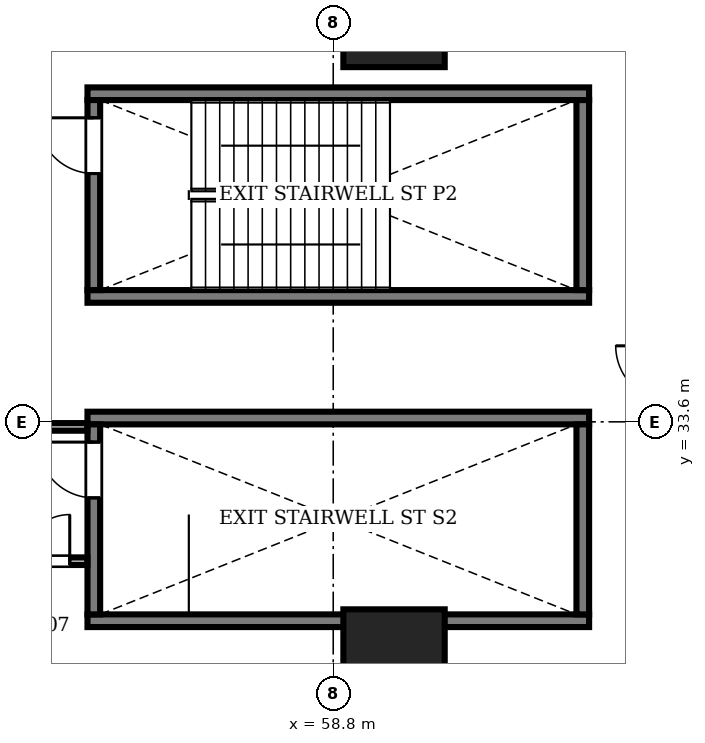
"""IFC4 building model, lengths in metres.
Left out: names, types, materials, properties, quantities, classifications, styles, units other than length and angle.
Written with IfcOpenShell. Run it as: python <this file> out.ifc"""

import sys

from ifc_helpers import new_model, si_unit, direction, frame, frame_2d, origin, origin_2d, place, context, subcontext, project, spatial, rectangle, extrude, source, transform, mapped, element, fill, save


model = new_model("IFC4")
c1 = context("Model", 3, precision=1e-05, world=origin(), true_north=direction((0.0, 1.0)))
c2 = subcontext(c1, "Body", "Model", "MODEL_VIEW")
j1 = project(units=[si_unit("LENGTHUNIT", "METRE"), si_unit("PLANEANGLEUNIT", "RADIAN")], contexts=[c1])
p1 = place(None, origin())
s1 = spatial("IfcSite", under=j1, at=p1, CompositionType="ELEMENT")
p2 = place(p1, origin())
s2 = spatial("IfcBuilding", under=s1, at=p2, CompositionType="ELEMENT")
p3 = place(p2, frame((0.0, 0.0, 6.0)))
s3 = spatial("IfcBuildingStorey", under=s2, at=p3, CompositionType="ELEMENT", Elevation=6.0)
m1 = source(origin(), c2, "Body", "SweptSolid", [
    extrude(rectangle(XDim=2.0, YDim=2.0, at=origin_2d()), origin(), (0.0, 0.0, 1.0), 5.0),
])
for number, where, z_axis, x_axis in (
    (1, (60.0, 28.9, 0.0), (0.0, 0.0, 1.0), (1.0, 0.0, 0.0)),
    (2, (60.0, 41.6, 0.0), (0.0, 0.0, 1.0), (1.0, 0.0, 0.0)),
):
    element("IfcColumn", number, at=place(p3, frame(where, z_axis=z_axis, x_axis=x_axis)), inside=s3, PredefinedType="COLUMN", context=c2, shape_type="MappedRepresentation", body=[
        mapped(m1, transform((0.0, 0.0, 0.0), scale=1.0)),
    ])
m2 = source(origin(), c2, "Body", "SweptSolid", [
    extrude(rectangle(XDim=9.9, YDim=0.25, at=frame_2d((4.95, 0.0))), origin(), (0.0, 0.0, 1.0), 5.0),
])
for number, where, z_axis, x_axis in (
    (3, (53.95, 29.675, 0.0), (0.0, 0.0, 1.0), (1.0, 0.0, 0.0)),
    (4, (53.95, 33.675, 0.0), (0.0, 0.0, 1.0), (1.0, 0.0, 0.0)),
):
    element("IfcWall", number, at=place(p3, frame(where, z_axis=z_axis, x_axis=x_axis)), inside=s3, PredefinedType="SOLIDWALL", context=c2, shape_type="MappedRepresentation", body=[
        mapped(m2, transform((0.0, 0.0, 0.0), scale=1.0)),
    ])
m3 = source(origin(), c2, "Body", "SweptSolid", [
    extrude(rectangle(XDim=3.75, YDim=0.25, at=frame_2d((1.875, 0.0))), origin(), (0.0, 0.0, 1.0), 5.0),
])
p4 = place(p3, frame((63.725, 29.8, 0.0), z_axis=(0.0, 0.0, 1.0), x_axis=(0.0, 1.0, 0.0)))
e5 = element("IfcWall", 5, at=p4, inside=s3, PredefinedType="SOLIDWALL", context=c2, shape_type="MappedRepresentation", body=[
    mapped(m3, transform((0.0, 0.0, 0.0), scale=1.0)),
])
p5 = place(p3, frame((54.075, 29.8, 0.0), z_axis=(0.0, 0.0, 1.0), x_axis=(0.0, 1.0, 0.0)))
e6 = element("IfcWall", 6, at=p5, inside=s3, PredefinedType="SOLIDWALL", context=c2, shape_type="MappedRepresentation", body=[
    mapped(m3, transform((0.0, 0.0, 0.0), scale=1.0)),
])
m4 = source(origin(), c2, "Body", "SweptSolid", [
    extrude(rectangle(XDim=1.1, YDim=2.2, at=frame_2d((0.55, 1.1))), frame((0.0, 0.135, 0.0), z_axis=(0.0, -1.0, 0.0), x_axis=(1.0, 0.0, 0.0)), (0.0, 0.0, 1.0), 0.27),
])
p6 = place(p5, frame((2.3, 0.0, 0.0)))
e7 = element("IfcOpeningElement", 7, at=p6, cuts=e6, PredefinedType="OPENING", context=c2, shape_type="MappedRepresentation", body=[
    mapped(m4, transform((0.0, 0.0, 0.0), scale=1.0)),
])
m5 = source(origin(), c2, "Body", "SweptSolid", [
    extrude(rectangle(XDim=9.9, YDim=0.25, at=frame_2d((4.95, 0.0))), origin(), (0.0, 0.0, 1.0), 5.2),
])
for number, where, z_axis, x_axis in (
    (8, (53.95, 36.075, 0.0), (0.0, 0.0, 1.0), (1.0, 0.0, 0.0)),
    (9, (53.95, 40.075, 0.0), (0.0, 0.0, 1.0), (1.0, 0.0, 0.0)),
):
    element("IfcWall", number, at=place(p3, frame(where, z_axis=z_axis, x_axis=x_axis)), inside=s3, PredefinedType="SOLIDWALL", context=c2, shape_type="MappedRepresentation", body=[
        mapped(m5, transform((0.0, 0.0, 0.0), scale=1.0)),
    ])
m6 = source(origin(), c2, "Body", "SweptSolid", [
    extrude(rectangle(XDim=3.75, YDim=0.25, at=frame_2d((1.875, 0.0))), origin(), (0.0, 0.0, 1.0), 5.2),
])
p7 = place(p3, frame((63.725, 36.2, 0.0), z_axis=(0.0, 0.0, 1.0), x_axis=(0.0, 1.0, 0.0)))
e10 = element("IfcWall", 10, at=p7, inside=s3, PredefinedType="SOLIDWALL", context=c2, shape_type="MappedRepresentation", body=[
    mapped(m6, transform((0.0, 0.0, 0.0), scale=1.0)),
])
p8 = place(p3, frame((54.075, 36.2, 0.0), z_axis=(0.0, 0.0, 1.0), x_axis=(0.0, 1.0, 0.0)))
e11 = element("IfcWall", 11, at=p8, inside=s3, PredefinedType="SOLIDWALL", context=c2, shape_type="MappedRepresentation", body=[
    mapped(m6, transform((0.0, 0.0, 0.0), scale=1.0)),
])
p9 = place(p8, frame((2.3, 0.0, 0.0)))
e12 = element("IfcOpeningElement", 12, at=p9, cuts=e11, PredefinedType="OPENING", context=c2, shape_type="MappedRepresentation", body=[
    mapped(m4, transform((0.0, 0.0, 0.0), scale=1.0)),
])
m7 = source(origin(), c2, "Body", "SweptSolid", [
    extrude(rectangle(XDim=1.588, YDim=0.15, at=frame_2d((0.794, 0.0))), origin(), (0.0, 0.0, 1.0), 5.0),
])
p10 = place(p3, frame((52.36, 30.85, 0.0), z_axis=(0.0, 0.0, 1.0), x_axis=(1.0, 0.0, 0.0)))
e13 = element("IfcWall", 13, at=p10, inside=s3, PredefinedType="PARTITIONING", context=c2, shape_type="MappedRepresentation", body=[
    mapped(m7, transform((0.0, 0.0, 0.0), scale=1.0)),
])
m8 = source(origin(), c2, "Body", "SweptSolid", [
    extrude(rectangle(XDim=0.92, YDim=2.1, at=frame_2d((0.46, 1.05))), frame((0.0, 0.085, 0.0), z_axis=(0.0, -1.0, 0.0), x_axis=(1.0, 0.0, 0.0)), (0.0, 0.0, 1.0), 0.17),
])
p11 = place(p10, frame((0.32, 0.0, 0.0)))
e14 = element("IfcOpeningElement", 14, at=p11, cuts=e13, PredefinedType="OPENING", context=c2, shape_type="MappedRepresentation", body=[
    mapped(m8, transform((0.0, 0.0, 0.0), scale=1.0)),
])
p12 = place(p3, frame((52.36, 33.5, 0.0), z_axis=(0.0, 0.0, 1.0), x_axis=(1.0, 0.0, 0.0)))
e15 = element("IfcWall", 15, at=p12, inside=s3, PredefinedType="PARTITIONING", context=c2, shape_type="MappedRepresentation", body=[
    mapped(m7, transform((0.0, 0.0, 0.0), scale=1.0)),
])
m9 = source(origin(), c2, "Body", "SweptSolid", [
    extrude(rectangle(XDim=1.1, YDim=2.2, at=frame_2d((0.55, 1.1))), frame((0.0, 0.025, 0.0), z_axis=(0.0, -1.0, 0.0), x_axis=(1.0, 0.0, 0.0)), (0.0, 0.0, 1.0), 0.05),
])
p13 = place(p6, origin())
e16 = element("IfcDoor", 16, at=p13, inside=s3, OperationType="SINGLE_SWING_RIGHT", PredefinedType="DOOR", context=c2, shape_type="MappedRepresentation", body=[
    mapped(m9, transform((0.0, 0.0, 0.0), scale=1.0)),
])
fill(e7, e16)
p14 = place(p9, origin())
e17 = element("IfcDoor", 17, at=p14, inside=s3, OperationType="SINGLE_SWING_RIGHT", PredefinedType="DOOR", context=c2, shape_type="MappedRepresentation", body=[
    mapped(m9, transform((0.0, 0.0, 0.0), scale=1.0)),
])
fill(e12, e17)
m10 = source(origin(), c2, "Body", "SweptSolid", [
    extrude(rectangle(XDim=0.92, YDim=2.1, at=frame_2d((0.46, 1.05))), frame((0.0, 0.025, 0.0), z_axis=(0.0, -1.0, 0.0), x_axis=(1.0, 0.0, 0.0)), (0.0, 0.0, 1.0), 0.05),
])
p15 = place(p11, origin())
e18 = element("IfcDoor", 18, at=p15, inside=s3, OperationType="SINGLE_SWING_RIGHT", PredefinedType="DOOR", context=c2, shape_type="MappedRepresentation", body=[
    mapped(m10, transform((0.0, 0.0, 0.0), scale=1.0)),
])
fill(e14, e18)
save(model, sys.argv[1])
